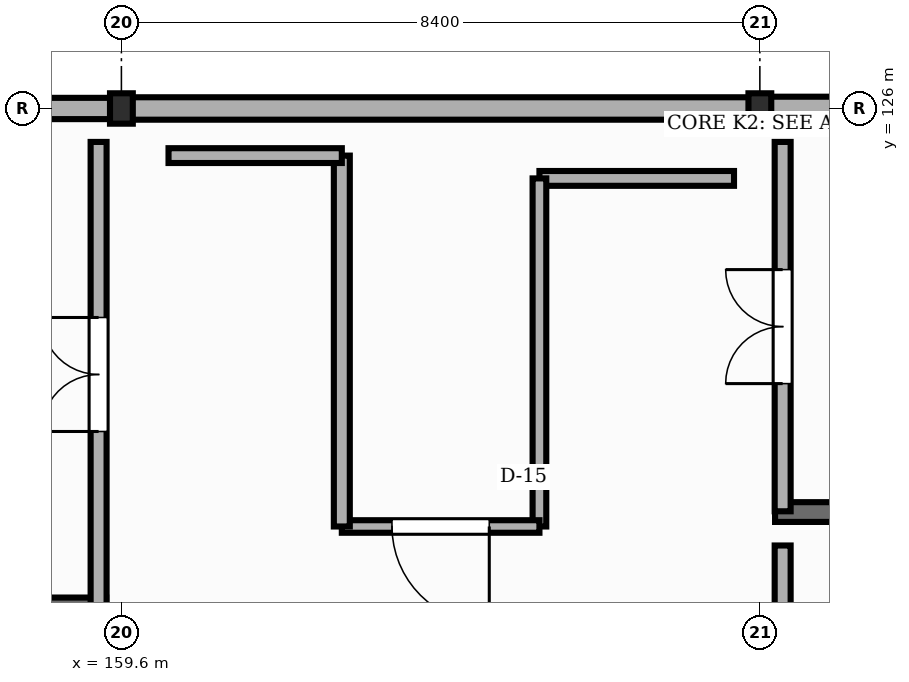
"""IFC4 building model, lengths in metres.
Left out: names, types, materials, properties, quantities, classifications, styles, units other than length and angle.
Written with IfcOpenShell. Run it as: python <this file> out.ifc"""

import sys

from ifc_helpers import new_model, si_unit, direction, frame, frame_2d, origin, origin_2d, place, context, subcontext, project, spatial, rectangle, i_section, extrude, element, fill, save


model = new_model("IFC4")
c1 = context("Model", 3, precision=1e-05, world=origin(), true_north=direction((0.0, 1.0)))
c2 = subcontext(c1, "Body", "Model", "MODEL_VIEW")
j1 = project(units=[si_unit("LENGTHUNIT", "METRE"), si_unit("PLANEANGLEUNIT", "RADIAN")], contexts=[c1])
p1 = place(None, origin())
s1 = spatial("IfcSite", under=j1, at=p1, CompositionType="ELEMENT")
p2 = place(p1, origin())
s2 = spatial("IfcBuilding", under=s1, at=p2, CompositionType="ELEMENT")
p3 = place(p2, frame((0.0, 0.0, 22.05)))
s3 = spatial("IfcBuildingStorey", under=s2, at=p3, CompositionType="ELEMENT", Elevation=22.05)
for number, where, z_axis, x_axis in (
    (1, (159.6, 126.0, 0.0), (0.0, 0.0, 1.0), (1.0, 0.0, 0.0)),
    (2, (168.0, 126.0, 0.0), (0.0, 0.0, 1.0), (1.0, 0.0, 0.0)),
):
    element("IfcColumn", number, at=place(p3, frame(where, z_axis=z_axis, x_axis=x_axis)), inside=s3, PredefinedType="COLUMN", context=c2, shape_type="SweptSolid", body=[
        extrude(i_section(OverallWidth=0.3, OverallDepth=0.4, WebThickness=0.013, FlangeThickness=0.024, FilletRadius=0.027, at=origin_2d()), origin(), (0.0, 0.0, 1.0), 4.05),
    ])
p4 = place(p3, frame((176.392, 126.0, 0.0), z_axis=(0.0, 0.0, 1.0), x_axis=(-1.0, 0.0, 0.0)))
e3 = element("IfcWall", 3, at=p4, inside=s3, PredefinedType="STANDARD", context=c2, shape_type="SweptSolid", body=[
    extrude(rectangle(XDim=8.384, YDim=0.31, at=frame_2d((4.192, 0.0))), origin(), (0.0, 0.0, 1.0), 3.527),
])
p5 = place(p3, frame((167.992, 126.0, 0.0), z_axis=(0.0, 0.0, 1.0), x_axis=(-1.0, 0.0, 0.0)))
e4 = element("IfcWall", 4, at=p5, inside=s3, PredefinedType="STANDARD", context=c2, shape_type="SweptSolid", body=[
    extrude(rectangle(XDim=8.384, YDim=0.295, at=frame_2d((4.192, 0.0))), origin(), (0.0, 0.0, 1.0), 3.497),
])
p6 = place(p3, frame((159.592, 126.0, 0.0), z_axis=(0.0, 0.0, 1.0), x_axis=(-1.0, 0.0, 0.0)))
e5 = element("IfcWall", 5, at=p6, inside=s3, PredefinedType="STANDARD", context=c2, shape_type="SweptSolid", body=[
    extrude(rectangle(XDim=8.384, YDim=0.28, at=frame_2d((4.192, 0.0))), origin(), (0.0, 0.0, 1.0), 3.527),
])
p7 = place(p3, frame((156.365, 119.435, 0.0), z_axis=(0.0, 0.0, 1.0), x_axis=(1.0, 0.0, 0.0)))
e6 = element("IfcWall", 6, at=p7, inside=s3, PredefinedType="SHEAR", context=c2, shape_type="SweptSolid", body=[
    extrude(rectangle(XDim=3.035, YDim=0.26, at=frame_2d((1.518, 0.0))), origin(), (0.0, 0.0, 1.0), 3.85),
])
p8 = place(p3, frame((159.3, 119.44, 0.0), z_axis=(0.0, 0.0, 1.0), x_axis=(0.0, 1.0, 0.0)))
e7 = element("IfcWall", 7, at=p8, inside=s3, PredefinedType="STANDARD", context=c2, shape_type="SweptSolid", body=[
    extrude(rectangle(XDim=6.12, YDim=0.21, at=frame_2d((3.06, 0.0))), origin(), (0.0, 0.0, 1.0), 3.257),
])
p9 = place(p8, frame((2.31, 0.0, 0.0)))
e8 = element("IfcOpeningElement", 8, at=p9, cuts=e7, PredefinedType="OPENING", context=c2, shape_type="SweptSolid", body=[
    extrude(rectangle(XDim=1.5, YDim=2.2, at=frame_2d((0.75, 1.1))), frame((0.0, 0.115, 0.0), z_axis=(0.0, -1.0, 0.0), x_axis=(1.0, 0.0, 0.0)), (0.0, 0.0, 1.0), 0.23),
])
p10 = place(p3, frame((168.2, 120.69, 0.0), z_axis=(0.0, 0.0, 1.0), x_axis=(1.0, 0.0, 0.0)))
e9 = element("IfcWall", 9, at=p10, inside=s3, PredefinedType="SHEAR", context=c2, shape_type="SweptSolid", body=[
    extrude(rectangle(XDim=3.035, YDim=0.26, at=frame_2d((1.518, 0.0))), origin(), (0.0, 0.0, 1.0), 3.85),
])
p11 = place(p3, frame((168.3, 115.92, 0.0), z_axis=(0.0, 0.0, 1.0), x_axis=(0.0, 1.0, 0.0)))
e10 = element("IfcWall", 10, at=p11, inside=s3, PredefinedType="STANDARD", context=c2, shape_type="SweptSolid", body=[
    extrude(rectangle(XDim=4.33, YDim=0.21, at=frame_2d((2.165, 0.0))), origin(), (0.0, 0.0, 1.0), 3.257),
])
p12 = place(p11, frame((0.45, 0.0, 0.0)))
e11 = element("IfcOpeningElement", 11, at=p12, cuts=e10, PredefinedType="OPENING", context=c2, shape_type="SweptSolid", body=[
    extrude(rectangle(XDim=0.95, YDim=2.15, at=frame_2d((0.475, 1.075))), frame((0.0, 0.115, 0.0), z_axis=(0.0, -1.0, 0.0), x_axis=(1.0, 0.0, 0.0)), (0.0, 0.0, 1.0), 0.23),
])
p13 = place(p3, frame((168.3, 120.7, 0.0), z_axis=(0.0, 0.0, 1.0), x_axis=(0.0, 1.0, 0.0)))
e12 = element("IfcWall", 12, at=p13, inside=s3, PredefinedType="STANDARD", context=c2, shape_type="SweptSolid", body=[
    extrude(rectangle(XDim=4.86, YDim=0.21, at=frame_2d((2.43, 0.0))), origin(), (0.0, 0.0, 1.0), 3.367),
])
p14 = place(p13, frame((1.68, 0.0, 0.0)))
e13 = element("IfcOpeningElement", 13, at=p14, cuts=e12, PredefinedType="OPENING", context=c2, shape_type="SweptSolid", body=[
    extrude(rectangle(XDim=1.5, YDim=2.2, at=frame_2d((0.75, 1.1))), frame((0.0, 0.115, 0.0), z_axis=(0.0, -1.0, 0.0), x_axis=(1.0, 0.0, 0.0)), (0.0, 0.0, 1.0), 0.23),
])
p15 = place(p3, frame((167.66, 125.08, -0.004), z_axis=(0.0, 0.0, 1.0), x_axis=(-1.0, 0.0, 0.0)))
e14 = element("IfcWall", 14, at=p15, inside=s3, PredefinedType="STANDARD", context=c2, shape_type="SweptSolid", body=[
    extrude(rectangle(XDim=2.56, YDim=0.195, at=frame_2d((1.28, 0.0))), origin(), (0.0, 0.0, 1.0), 3.854),
])
p16 = place(p3, frame((165.1, 125.08, -0.004), z_axis=(0.0, 0.0, 1.0), x_axis=(0.0, -1.0, 0.0)))
e15 = element("IfcWall", 15, at=p16, inside=s3, PredefinedType="STANDARD", context=c2, shape_type="SweptSolid", body=[
    extrude(rectangle(XDim=4.58, YDim=0.18, at=frame_2d((2.29, 0.0))), origin(), (0.0, 0.0, 1.0), 3.561),
])
p17 = place(p3, frame((165.1, 120.5, -0.004), z_axis=(0.0, 0.0, 1.0), x_axis=(-1.0, 0.0, 0.0)))
e16 = element("IfcWall", 16, at=p17, inside=s3, PredefinedType="STANDARD", context=c2, shape_type="SweptSolid", body=[
    extrude(rectangle(XDim=2.6, YDim=0.165, at=frame_2d((1.3, 0.0))), origin(), (0.0, 0.0, 1.0), 3.854),
])
p18 = place(p17, frame((0.66, 0.0, 0.0)))
e17 = element("IfcOpeningElement", 17, at=p18, cuts=e16, PredefinedType="OPENING", context=c2, shape_type="SweptSolid", body=[
    extrude(rectangle(XDim=1.28, YDim=2.14, at=frame_2d((0.64, 1.07))), frame((0.0, 0.093, 0.0), z_axis=(0.0, -1.0, 0.0), x_axis=(1.0, 0.0, 0.0)), (0.0, 0.0, 1.0), 0.185),
])
p19 = place(p3, frame((162.5, 120.5, -0.004), z_axis=(0.0, 0.0, 1.0), x_axis=(0.0, 1.0, 0.0)))
e18 = element("IfcWall", 18, at=p19, inside=s3, PredefinedType="STANDARD", context=c2, shape_type="SweptSolid", body=[
    extrude(rectangle(XDim=4.88, YDim=0.21, at=frame_2d((2.44, 0.0))), origin(), (0.0, 0.0, 1.0), 3.561),
])
p20 = place(p3, frame((162.5, 125.38, -0.004), z_axis=(0.0, 0.0, 1.0), x_axis=(-1.0, 0.0, 0.0)))
e19 = element("IfcWall", 19, at=p20, inside=s3, PredefinedType="STANDARD", context=c2, shape_type="SweptSolid", body=[
    extrude(rectangle(XDim=2.28, YDim=0.195, at=frame_2d((1.14, 0.0))), origin(), (0.0, 0.0, 1.0), 3.854),
])
p21 = place(p9, origin())
e20 = element("IfcDoor", 20, at=p21, inside=s3, OperationType="DOUBLE_DOOR_SINGLE_SWING", PredefinedType="DOOR", context=c2, shape_type="SweptSolid", body=[
    extrude(rectangle(XDim=1.5, YDim=2.2, at=frame_2d((0.75, 1.1))), frame((0.0, 0.025, 0.0), z_axis=(0.0, -1.0, 0.0), x_axis=(1.0, 0.0, 0.0)), (0.0, 0.0, 1.0), 0.05),
])
fill(e8, e20)
p22 = place(p14, origin())
e21 = element("IfcDoor", 21, at=p22, inside=s3, OperationType="DOUBLE_DOOR_SINGLE_SWING", PredefinedType="DOOR", context=c2, shape_type="SweptSolid", body=[
    extrude(rectangle(XDim=1.5, YDim=2.2, at=frame_2d((0.75, 1.1))), frame((0.0, 0.025, 0.0), z_axis=(0.0, -1.0, 0.0), x_axis=(1.0, 0.0, 0.0)), (0.0, 0.0, 1.0), 0.05),
])
fill(e13, e21)
p23 = place(p18, origin())
e22 = element("IfcDoor", 22, at=p23, inside=s3, OperationType="SINGLE_SWING_LEFT", PredefinedType="DOOR", context=c2, shape_type="SweptSolid", body=[
    extrude(rectangle(XDim=1.28, YDim=2.14, at=frame_2d((0.64, 1.07))), frame((0.0, 0.025, 0.0), z_axis=(0.0, -1.0, 0.0), x_axis=(1.0, 0.0, 0.0)), (0.0, 0.0, 1.0), 0.05),
])
fill(e17, e22)
save(model, sys.argv[1])
